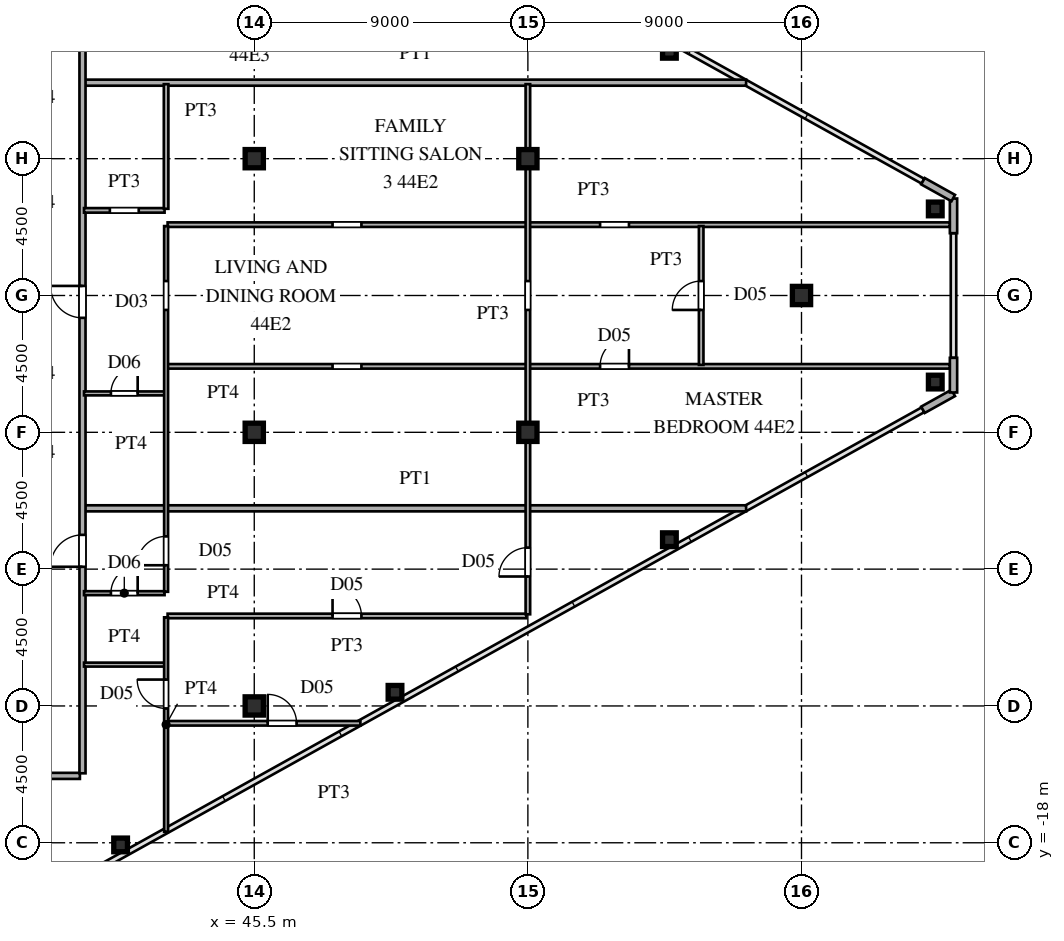
"""IFC4 building model, lengths in metres.
Left out: names, types, materials, properties, quantities, classifications, styles, units other than length and angle.
Written with IfcOpenShell. Run it as: python <this file> out.ifc"""

import sys

from ifc_helpers import new_model, si_unit, direction, frame, frame_2d, origin, origin_2d, place, context, subcontext, project, spatial, rectangle, hollow_rectangle, i_section, extrude, source, transform, mapped, element, fill, save


model = new_model("IFC4")
c1 = context("Model", 3, precision=1e-05, world=origin(), true_north=direction((0.0, 1.0)))
c2 = subcontext(c1, "Body", "Model", "MODEL_VIEW")
j1 = project(units=[si_unit("LENGTHUNIT", "METRE"), si_unit("PLANEANGLEUNIT", "RADIAN")], contexts=[c1])
p1 = place(None, origin())
s1 = spatial("IfcSite", under=j1, at=p1, CompositionType="ELEMENT")
p2 = place(p1, origin())
s2 = spatial("IfcBuilding", under=s1, at=p2, CompositionType="ELEMENT")
p3 = place(p2, frame((0.0, 0.0, 167.1)))
s3 = spatial("IfcBuildingStorey", under=s2, at=p3, CompositionType="ELEMENT", Elevation=167.1)
m1 = source(origin(), c2, "Body", "SweptSolid", [
    extrude(i_section(OverallWidth=0.6, OverallDepth=0.6, WebThickness=0.025, FlangeThickness=0.04, at=origin_2d()), origin(), (0.0, 0.0, 1.0), 3.6),
])
for number, where, z_axis, x_axis in (
    (1, (45.5, -13.5, 0.0), (0.0, 0.0, 1.0), (1.0, 0.0, 0.0)),
    (2, (45.5, -4.5, 0.0), (0.0, 0.0, 1.0), (1.0, 0.0, 0.0)),
    (3, (45.5, 4.5, 0.0), (0.0, 0.0, 1.0), (1.0, 0.0, 0.0)),
    (4, (54.5, -4.5, 0.0), (0.0, 0.0, 1.0), (1.0, 0.0, 0.0)),
    (5, (54.5, 4.5, 0.0), (0.0, 0.0, 1.0), (1.0, 0.0, 0.0)),
    (6, (63.5, 0.0, 0.0), (0.0, 0.0, 1.0), (1.0, 0.0, 0.0)),
):
    element("IfcColumn", number, at=place(p3, frame(where, z_axis=z_axis, x_axis=x_axis)), inside=s3, PredefinedType="COLUMN", context=c2, shape_type="MappedRepresentation", body=[
        mapped(m1, transform((0.0, 0.0, 0.0), scale=1.0)),
    ])
m2 = source(origin(), c2, "Body", "SweptSolid", [
    extrude(hollow_rectangle(XDim=0.45, YDim=0.45, WallThickness=0.018, at=origin_2d()), origin(), (0.0, 0.0, 1.0), 3.6),
])
for number, where, z_axis, x_axis in (
    (7, (67.9, -2.847, 0.0), (0.0, 0.0, 1.0), (1.0, 0.0, 0.0)),
    (8, (67.9, 2.847, 0.0), (0.0, 0.0, 1.0), (1.0, 0.0, 0.0)),
    (9, (41.104, -18.071, 0.0), (0.0, 0.0, 1.0), (1.0, 0.0, 0.0)),
    (10, (50.129, -13.051, 0.0), (0.0, 0.0, 1.0), (1.0, 0.0, 0.0)),
    (11, (59.155, -8.031, 0.0), (0.0, 0.0, 1.0), (1.0, 0.0, 0.0)),
    (12, (59.155, 8.031, 0.0), (0.0, 0.0, 1.0), (1.0, 0.0, 0.0)),
):
    element("IfcColumn", number, at=place(p3, frame(where, z_axis=z_axis, x_axis=x_axis)), inside=s3, PredefinedType="COLUMN", context=c2, shape_type="MappedRepresentation", body=[
        mapped(m2, transform((0.0, 0.0, 0.0), scale=1.0)),
    ])
for number, where, z_axis, x_axis in (
    (13, (67.495, -3.759, 0.0), (0.0, 0.0, 1.0), (0.874, 0.486, 0.0)),
    (14, (68.5, -3.19, 0.0), (0.0, 0.0, 1.0), (0.0, 1.0, 0.0)),
    (15, (68.5, 2.05, 0.0), (0.0, 0.0, 1.0), (0.0, 1.0, 0.0)),
    (16, (68.491, 3.205, 0.0), (0.0, 0.0, 1.0), (-0.874, 0.486, 0.0)),
):
    element("IfcWall", number, at=place(p3, frame(where, z_axis=z_axis, x_axis=x_axis)), inside=s3, PredefinedType="SOLIDWALL", context=c2, shape_type="SweptSolid", body=[
        extrude(rectangle(XDim=1.14, YDim=0.24, at=frame_2d((0.57, 0.0))), origin(), (0.0, 0.0, 1.0), 3.38),
    ])
p4 = place(p3, frame((27.5, -15.8, 0.0), z_axis=(0.0, 0.0, 1.0), x_axis=(1.0, 0.0, 0.0)))
e17 = element("IfcWall", 17, at=p4, inside=s3, PredefinedType="PARTITIONING", context=c2, shape_type="SweptSolid", body=[
    extrude(rectangle(XDim=12.265, YDim=0.2, at=frame_2d((6.132, 0.0))), origin(), (0.0, 0.0, 1.0), 3.38),
])
p5 = place(p3, frame((42.65, -14.07, 0.0), z_axis=(0.0, 0.0, 1.0), x_axis=(1.0, 0.0, 0.0)))
e18 = element("IfcWall", 18, at=p5, inside=s3, PredefinedType="PARTITIONING", context=c2, shape_type="SweptSolid", body=[
    extrude(rectangle(XDim=6.341, YDim=0.15, at=frame_2d((3.17, 0.0))), origin(), (0.0, 0.0, 1.0), 3.38),
])
p6 = place(p5, frame((3.292, 0.0, 0.0)))
e19 = element("IfcOpeningElement", 19, at=p6, cuts=e18, PredefinedType="OPENING", context=c2, shape_type="SweptSolid", body=[
    extrude(rectangle(XDim=0.95, YDim=2.15, at=frame_2d((0.475, 1.075))), frame((0.0, 0.085, 0.0), z_axis=(0.0, -1.0, 0.0), x_axis=(1.0, 0.0, 0.0)), (0.0, 0.0, 1.0), 0.17),
])
p7 = place(p3, frame((39.9, -12.14, 0.0), z_axis=(0.0, 0.0, 1.0), x_axis=(1.0, 0.0, 0.0)))
e20 = element("IfcWall", 20, at=p7, inside=s3, PredefinedType="PARTITIONING", context=c2, shape_type="SweptSolid", body=[
    extrude(rectangle(XDim=2.65, YDim=0.13, at=frame_2d((1.325, 0.0))), origin(), (0.0, 0.0, 1.0), 3.38),
])
p8 = place(p3, frame((42.65, -10.54, 0.0), z_axis=(0.0, 0.0, 1.0), x_axis=(1.0, 0.0, 0.0)))
e21 = element("IfcWall", 21, at=p8, inside=s3, PredefinedType="PARTITIONING", context=c2, shape_type="SweptSolid", body=[
    extrude(rectangle(XDim=11.8, YDim=0.15, at=frame_2d((5.9, 0.0))), origin(), (0.0, 0.0, 1.0), 3.38),
])
p9 = place(p8, frame((5.425, 0.0, 0.0)))
e22 = element("IfcOpeningElement", 22, at=p9, cuts=e21, PredefinedType="OPENING", context=c2, shape_type="SweptSolid", body=[
    extrude(rectangle(XDim=0.95, YDim=2.15, at=frame_2d((0.475, 1.075))), frame((0.0, 0.085, 0.0), z_axis=(0.0, -1.0, 0.0), x_axis=(1.0, 0.0, 0.0)), (0.0, 0.0, 1.0), 0.17),
])
p10 = place(p3, frame((39.9, -9.79, 0.0), z_axis=(0.0, 0.0, 1.0), x_axis=(1.0, 0.0, 0.0)))
e23 = element("IfcWall", 23, at=p10, inside=s3, PredefinedType="PARTITIONING", context=c2, shape_type="SweptSolid", body=[
    extrude(rectangle(XDim=2.65, YDim=0.13, at=frame_2d((1.325, 0.0))), origin(), (0.0, 0.0, 1.0), 3.38),
])
p11 = place(p10, frame((0.885, 0.0, 0.0)))
e24 = element("IfcOpeningElement", 24, at=p11, cuts=e23, PredefinedType="OPENING", context=c2, shape_type="SweptSolid", body=[
    extrude(rectangle(XDim=0.88, YDim=2.1, at=frame_2d((0.44, 1.05))), frame((0.0, 0.075, 0.0), z_axis=(0.0, -1.0, 0.0), x_axis=(1.0, 0.0, 0.0)), (0.0, 0.0, 1.0), 0.15),
])
p12 = place(p3, frame((39.93, -7.0, 0.0), z_axis=(0.0, 0.0, 1.0), x_axis=(1.0, 0.0, 0.0)))
e25 = element("IfcWall", 25, at=p12, inside=s3, PredefinedType="PARTITIONING", context=c2, shape_type="SweptSolid", body=[
    extrude(rectangle(XDim=21.748, YDim=0.2, at=frame_2d((10.874, 0.0))), origin(), (0.0, 0.0, 1.0), 3.38),
])
p13 = place(p3, frame((39.9, -3.22, 0.0), z_axis=(0.0, 0.0, 1.0), x_axis=(1.0, 0.0, 0.0)))
e26 = element("IfcWall", 26, at=p13, inside=s3, PredefinedType="PARTITIONING", context=c2, shape_type="SweptSolid", body=[
    extrude(rectangle(XDim=2.65, YDim=0.13, at=frame_2d((1.325, 0.0))), origin(), (0.0, 0.0, 1.0), 3.38),
])
p14 = place(p13, frame((0.885, 0.0, 0.0)))
e27 = element("IfcOpeningElement", 27, at=p14, cuts=e26, PredefinedType="OPENING", context=c2, shape_type="SweptSolid", body=[
    extrude(rectangle(XDim=0.88, YDim=2.1, at=frame_2d((0.44, 1.05))), frame((0.0, 0.075, 0.0), z_axis=(0.0, -1.0, 0.0), x_axis=(1.0, 0.0, 0.0)), (0.0, 0.0, 1.0), 0.15),
])
p15 = place(p3, frame((42.65, -2.33, 0.0), z_axis=(0.0, 0.0, 1.0), x_axis=(1.0, 0.0, 0.0)))
e28 = element("IfcWall", 28, at=p15, inside=s3, PredefinedType="PARTITIONING", context=c2, shape_type="SweptSolid", body=[
    extrude(rectangle(XDim=25.725, YDim=0.15, at=frame_2d((12.863, 0.0))), origin(), (0.0, 0.0, 1.0), 3.38),
])
p16 = place(p15, frame((5.425, 0.0, 0.0)))
e29 = element("IfcOpeningElement", 29, at=p16, cuts=e28, PredefinedType="OPENING", context=c2, shape_type="SweptSolid", body=[
    extrude(rectangle(XDim=0.95, YDim=2.15, at=frame_2d((0.475, 1.075))), frame((0.0, 0.085, 0.0), z_axis=(0.0, -1.0, 0.0), x_axis=(1.0, 0.0, 0.0)), (0.0, 0.0, 1.0), 0.17),
])
p17 = place(p15, frame((14.225, 0.0, 0.0)))
e30 = element("IfcOpeningElement", 30, at=p17, cuts=e28, PredefinedType="OPENING", context=c2, shape_type="SweptSolid", body=[
    extrude(rectangle(XDim=0.95, YDim=2.15, at=frame_2d((0.475, 1.075))), frame((0.0, 0.085, 0.0), z_axis=(0.0, -1.0, 0.0), x_axis=(1.0, 0.0, 0.0)), (0.0, 0.0, 1.0), 0.17),
])
p18 = place(p3, frame((42.65, 2.33, 0.0), z_axis=(0.0, 0.0, 1.0), x_axis=(1.0, 0.0, 0.0)))
e31 = element("IfcWall", 31, at=p18, inside=s3, PredefinedType="PARTITIONING", context=c2, shape_type="SweptSolid", body=[
    extrude(rectangle(XDim=25.725, YDim=0.15, at=frame_2d((12.863, 0.0))), origin(), (0.0, 0.0, 1.0), 3.38),
])
p19 = place(p18, frame((5.425, 0.0, 0.0)))
e32 = element("IfcOpeningElement", 32, at=p19, cuts=e31, PredefinedType="OPENING", context=c2, shape_type="SweptSolid", body=[
    extrude(rectangle(XDim=0.95, YDim=2.15, at=frame_2d((0.475, 1.075))), frame((0.0, 0.085, 0.0), z_axis=(0.0, -1.0, 0.0), x_axis=(1.0, 0.0, 0.0)), (0.0, 0.0, 1.0), 0.17),
])
p20 = place(p18, frame((14.225, 0.0, 0.0)))
e33 = element("IfcOpeningElement", 33, at=p20, cuts=e31, PredefinedType="OPENING", context=c2, shape_type="SweptSolid", body=[
    extrude(rectangle(XDim=0.95, YDim=2.15, at=frame_2d((0.475, 1.075))), frame((0.0, 0.085, 0.0), z_axis=(0.0, -1.0, 0.0), x_axis=(1.0, 0.0, 0.0)), (0.0, 0.0, 1.0), 0.17),
])
p21 = place(p3, frame((39.9, 2.8, 0.0), z_axis=(0.0, 0.0, 1.0), x_axis=(1.0, 0.0, 0.0)))
e34 = element("IfcWall", 34, at=p21, inside=s3, PredefinedType="PARTITIONING", context=c2, shape_type="SweptSolid", body=[
    extrude(rectangle(XDim=2.65, YDim=0.15, at=frame_2d((1.325, 0.0))), origin(), (0.0, 0.0, 1.0), 3.38),
])
p22 = place(p21, frame((0.85, 0.0, 0.0)))
e35 = element("IfcOpeningElement", 35, at=p22, cuts=e34, PredefinedType="OPENING", context=c2, shape_type="SweptSolid", body=[
    extrude(rectangle(XDim=0.95, YDim=2.15, at=frame_2d((0.475, 1.075))), frame((0.0, 0.085, 0.0), z_axis=(0.0, -1.0, 0.0), x_axis=(1.0, 0.0, 0.0)), (0.0, 0.0, 1.0), 0.17),
])
p23 = place(p3, frame((39.93, 7.0, 0.0), z_axis=(0.0, 0.0, 1.0), x_axis=(1.0, 0.0, 0.0)))
e36 = element("IfcWall", 36, at=p23, inside=s3, PredefinedType="PARTITIONING", context=c2, shape_type="SweptSolid", body=[
    extrude(rectangle(XDim=21.748, YDim=0.2, at=frame_2d((10.874, 0.0))), origin(), (0.0, 0.0, 1.0), 3.38),
])
p24 = place(p3, frame((39.85, -15.715, 0.0), z_axis=(0.0, 0.0, 1.0), x_axis=(0.0, 1.0, 0.0)))
e37 = element("IfcWall", 37, at=p24, inside=s3, PredefinedType="PARTITIONING", context=c2, shape_type="SweptSolid", body=[
    extrude(rectangle(XDim=31.43, YDim=0.2, at=frame_2d((15.715, 0.0))), origin(), (0.0, 0.0, 1.0), 3.38),
])
p25 = place(p24, frame((6.792, 0.0, 0.0)))
e38 = element("IfcOpeningElement", 38, at=p25, cuts=e37, PredefinedType="OPENING", context=c2, shape_type="SweptSolid", body=[
    extrude(rectangle(XDim=1.05, YDim=2.25, at=frame_2d((0.525, 1.125))), frame((0.0, 0.11, 0.0), z_axis=(0.0, -1.0, 0.0), x_axis=(1.0, 0.0, 0.0)), (0.0, 0.0, 1.0), 0.22),
])
p26 = place(p24, frame((14.98, 0.0, 0.0)))
e39 = element("IfcOpeningElement", 39, at=p26, cuts=e37, PredefinedType="OPENING", context=c2, shape_type="SweptSolid", body=[
    extrude(rectangle(XDim=1.05, YDim=2.25, at=frame_2d((0.525, 1.125))), frame((0.0, 0.11, 0.0), z_axis=(0.0, -1.0, 0.0), x_axis=(1.0, 0.0, 0.0)), (0.0, 0.0, 1.0), 0.22),
])
p27 = place(p24, frame((26.59, 0.0, 0.0)))
e40 = element("IfcOpeningElement", 40, at=p27, cuts=e37, PredefinedType="OPENING", context=c2, shape_type="SweptSolid", body=[
    extrude(rectangle(XDim=1.05, YDim=2.25, at=frame_2d((0.525, 1.125))), frame((0.0, 0.11, 0.0), z_axis=(0.0, -1.0, 0.0), x_axis=(1.0, 0.0, 0.0)), (0.0, 0.0, 1.0), 0.22),
])
p28 = place(p3, frame((42.6, -17.64, 0.0), z_axis=(0.0, 0.0, 1.0), x_axis=(0.0, 1.0, 0.0)))
e41 = element("IfcWall", 41, at=p28, inside=s3, PredefinedType="PARTITIONING", context=c2, shape_type="SweptSolid", body=[
    extrude(rectangle(XDim=7.055, YDim=0.13, at=frame_2d((3.527, 0.0))), origin(), (0.0, 0.0, 1.0), 3.38),
])
p29 = place(p28, frame((4.058, 0.0, 0.0)))
e42 = element("IfcOpeningElement", 42, at=p29, cuts=e41, PredefinedType="OPENING", context=c2, shape_type="SweptSolid", body=[
    extrude(rectangle(XDim=0.95, YDim=2.15, at=frame_2d((0.475, 1.075))), frame((0.0, 0.075, 0.0), z_axis=(0.0, -1.0, 0.0), x_axis=(1.0, 0.0, 0.0)), (0.0, 0.0, 1.0), 0.15),
])
p30 = place(p3, frame((42.6, -9.745, 0.0), z_axis=(0.0, 0.0, 1.0), x_axis=(0.0, 1.0, 0.0)))
e43 = element("IfcWall", 43, at=p30, inside=s3, PredefinedType="PARTITIONING", context=c2, shape_type="SweptSolid", body=[
    extrude(rectangle(XDim=12.028, YDim=0.13, at=frame_2d((6.014, 0.0))), origin(), (0.0, 0.0, 1.0), 3.38),
])
p31 = place(p30, frame((0.873, 0.0, 0.0)))
e44 = element("IfcOpeningElement", 44, at=p31, cuts=e43, PredefinedType="OPENING", context=c2, shape_type="SweptSolid", body=[
    extrude(rectangle(XDim=0.95, YDim=2.15, at=frame_2d((0.475, 1.075))), frame((0.0, 0.075, 0.0), z_axis=(0.0, -1.0, 0.0), x_axis=(1.0, 0.0, 0.0)), (0.0, 0.0, 1.0), 0.15),
])
p32 = place(p30, frame((9.27, 0.0, 0.0)))
e45 = element("IfcOpeningElement", 45, at=p32, cuts=e43, PredefinedType="OPENING", context=c2, shape_type="SweptSolid", body=[
    extrude(rectangle(XDim=0.95, YDim=2.15, at=frame_2d((0.475, 1.075))), frame((0.0, 0.075, 0.0), z_axis=(0.0, -1.0, 0.0), x_axis=(1.0, 0.0, 0.0)), (0.0, 0.0, 1.0), 0.15),
])
p33 = place(p3, frame((42.6, 2.852, 0.0), z_axis=(0.0, 0.0, 1.0), x_axis=(0.0, 1.0, 0.0)))
e46 = element("IfcWall", 46, at=p33, inside=s3, PredefinedType="PARTITIONING", context=c2, shape_type="SweptSolid", body=[
    extrude(rectangle(XDim=4.098, YDim=0.15, at=frame_2d((2.049, 0.0))), origin(), (0.0, 0.0, 1.0), 3.38),
])
p34 = place(p3, frame((54.5, -10.485, 0.0), z_axis=(0.0, 0.0, 1.0), x_axis=(0.0, 1.0, 0.0)))
e47 = element("IfcWall", 47, at=p34, inside=s3, PredefinedType="PARTITIONING", context=c2, shape_type="SweptSolid", body=[
    extrude(rectangle(XDim=17.435, YDim=0.15, at=frame_2d((8.718, 0.0))), origin(), (0.0, 0.0, 1.0), 2.78),
])
p35 = place(p34, frame((1.242, 0.0, 0.0)))
e48 = element("IfcOpeningElement", 48, at=p35, cuts=e47, PredefinedType="OPENING", context=c2, shape_type="SweptSolid", body=[
    extrude(rectangle(XDim=0.95, YDim=2.15, at=frame_2d((0.475, 1.075))), frame((0.0, 0.085, 0.0), z_axis=(0.0, -1.0, 0.0), x_axis=(1.0, 0.0, 0.0)), (0.0, 0.0, 1.0), 0.17),
])
p36 = place(p34, frame((10.01, 0.0, 0.0)))
e49 = element("IfcOpeningElement", 49, at=p36, cuts=e47, PredefinedType="OPENING", context=c2, shape_type="SweptSolid", body=[
    extrude(rectangle(XDim=0.95, YDim=2.15, at=frame_2d((0.475, 1.075))), frame((0.0, 0.085, 0.0), z_axis=(0.0, -1.0, 0.0), x_axis=(1.0, 0.0, 0.0)), (0.0, 0.0, 1.0), 0.17),
])
p37 = place(p3, frame((60.2, -2.283, 0.0), z_axis=(0.0, 0.0, 1.0), x_axis=(0.0, 1.0, 0.0)))
e50 = element("IfcWall", 50, at=p37, inside=s3, PredefinedType="PARTITIONING", context=c2, shape_type="SweptSolid", body=[
    extrude(rectangle(XDim=4.566, YDim=0.15, at=frame_2d((2.283, 0.0))), origin(), (0.0, 0.0, 1.0), 3.38),
])
p38 = place(p37, frame((1.808, 0.0, 0.0)))
e51 = element("IfcOpeningElement", 51, at=p38, cuts=e50, PredefinedType="OPENING", context=c2, shape_type="SweptSolid", body=[
    extrude(rectangle(XDim=0.95, YDim=2.15, at=frame_2d((0.475, 1.075))), frame((0.0, 0.085, 0.0), z_axis=(0.0, -1.0, 0.0), x_axis=(1.0, 0.0, 0.0)), (0.0, 0.0, 1.0), 0.17),
])
m3 = source(origin(), c2, "Body", "SweptSolid", [
    extrude(rectangle(XDim=0.95, YDim=2.15, at=frame_2d((0.475, 1.075))), frame((0.0, 0.025, 0.0), z_axis=(0.0, -1.0, 0.0), x_axis=(1.0, 0.0, 0.0)), (0.0, 0.0, 1.0), 0.05),
])
p39 = place(p6, origin())
e52 = element("IfcDoor", 52, at=p39, inside=s3, OperationType="SINGLE_SWING_LEFT", PredefinedType="DOOR", context=c2, shape_type="MappedRepresentation", body=[
    mapped(m3, transform((0.0, 0.0, 0.0), scale=1.0)),
])
fill(e19, e52)
p40 = place(p9, origin())
e53 = element("IfcDoor", 53, at=p40, inside=s3, OperationType="SINGLE_SWING_LEFT", PredefinedType="DOOR", context=c2, shape_type="MappedRepresentation", body=[
    mapped(m3, transform((0.0, 0.0, 0.0), scale=1.0)),
])
fill(e22, e53)
m4 = source(origin(), c2, "Body", "SweptSolid", [
    extrude(rectangle(XDim=0.88, YDim=2.1, at=frame_2d((0.44, 1.05))), frame((0.0, 0.025, 0.0), z_axis=(0.0, -1.0, 0.0), x_axis=(1.0, 0.0, 0.0)), (0.0, 0.0, 1.0), 0.05),
])
p41 = place(p11, origin())
e54 = element("IfcDoor", 54, at=p41, inside=s3, OperationType="SINGLE_SWING_RIGHT", PredefinedType="DOOR", context=c2, shape_type="MappedRepresentation", body=[
    mapped(m4, transform((0.0, 0.0, 0.0), scale=1.0)),
])
fill(e24, e54)
p42 = place(p14, origin())
e55 = element("IfcDoor", 55, at=p42, inside=s3, OperationType="SINGLE_SWING_RIGHT", PredefinedType="DOOR", context=c2, shape_type="MappedRepresentation", body=[
    mapped(m4, transform((0.0, 0.0, 0.0), scale=1.0)),
])
fill(e27, e55)
p43 = place(p17, origin())
e56 = element("IfcDoor", 56, at=p43, inside=s3, OperationType="SINGLE_SWING_RIGHT", PredefinedType="DOOR", context=c2, shape_type="MappedRepresentation", body=[
    mapped(m3, transform((0.0, 0.0, 0.0), scale=1.0)),
])
fill(e30, e56)
m5 = source(origin(), c2, "Body", "SweptSolid", [
    extrude(rectangle(XDim=1.05, YDim=2.25, at=frame_2d((0.525, 1.125))), frame((0.0, 0.025, 0.0), z_axis=(0.0, -1.0, 0.0), x_axis=(1.0, 0.0, 0.0)), (0.0, 0.0, 1.0), 0.05),
])
p44 = place(p25, origin())
e57 = element("IfcDoor", 57, at=p44, inside=s3, OperationType="SINGLE_SWING_LEFT", PredefinedType="DOOR", context=c2, shape_type="MappedRepresentation", body=[
    mapped(m5, transform((0.0, 0.0, 0.0), scale=1.0)),
])
fill(e38, e57)
p45 = place(p26, origin())
e58 = element("IfcDoor", 58, at=p45, inside=s3, OperationType="SINGLE_SWING_RIGHT", PredefinedType="DOOR", context=c2, shape_type="MappedRepresentation", body=[
    mapped(m5, transform((0.0, 0.0, 0.0), scale=1.0)),
])
fill(e39, e58)
p46 = place(p29, origin())
e59 = element("IfcDoor", 59, at=p46, inside=s3, OperationType="SINGLE_SWING_RIGHT", PredefinedType="DOOR", context=c2, shape_type="MappedRepresentation", body=[
    mapped(m3, transform((0.0, 0.0, 0.0), scale=1.0)),
])
fill(e42, e59)
p47 = place(p31, origin())
e60 = element("IfcDoor", 60, at=p47, inside=s3, OperationType="SINGLE_SWING_LEFT", PredefinedType="DOOR", context=c2, shape_type="MappedRepresentation", body=[
    mapped(m3, transform((0.0, 0.0, 0.0), scale=1.0)),
])
fill(e44, e60)
p48 = place(p35, origin())
e61 = element("IfcDoor", 61, at=p48, inside=s3, OperationType="SINGLE_SWING_LEFT", PredefinedType="DOOR", context=c2, shape_type="MappedRepresentation", body=[
    mapped(m3, transform((0.0, 0.0, 0.0), scale=1.0)),
])
fill(e48, e61)
p49 = place(p38, origin())
e62 = element("IfcDoor", 62, at=p49, inside=s3, OperationType="SINGLE_SWING_LEFT", PredefinedType="DOOR", context=c2, shape_type="MappedRepresentation", body=[
    mapped(m3, transform((0.0, 0.0, 0.0), scale=1.0)),
])
fill(e51, e62)
save(model, sys.argv[1])
